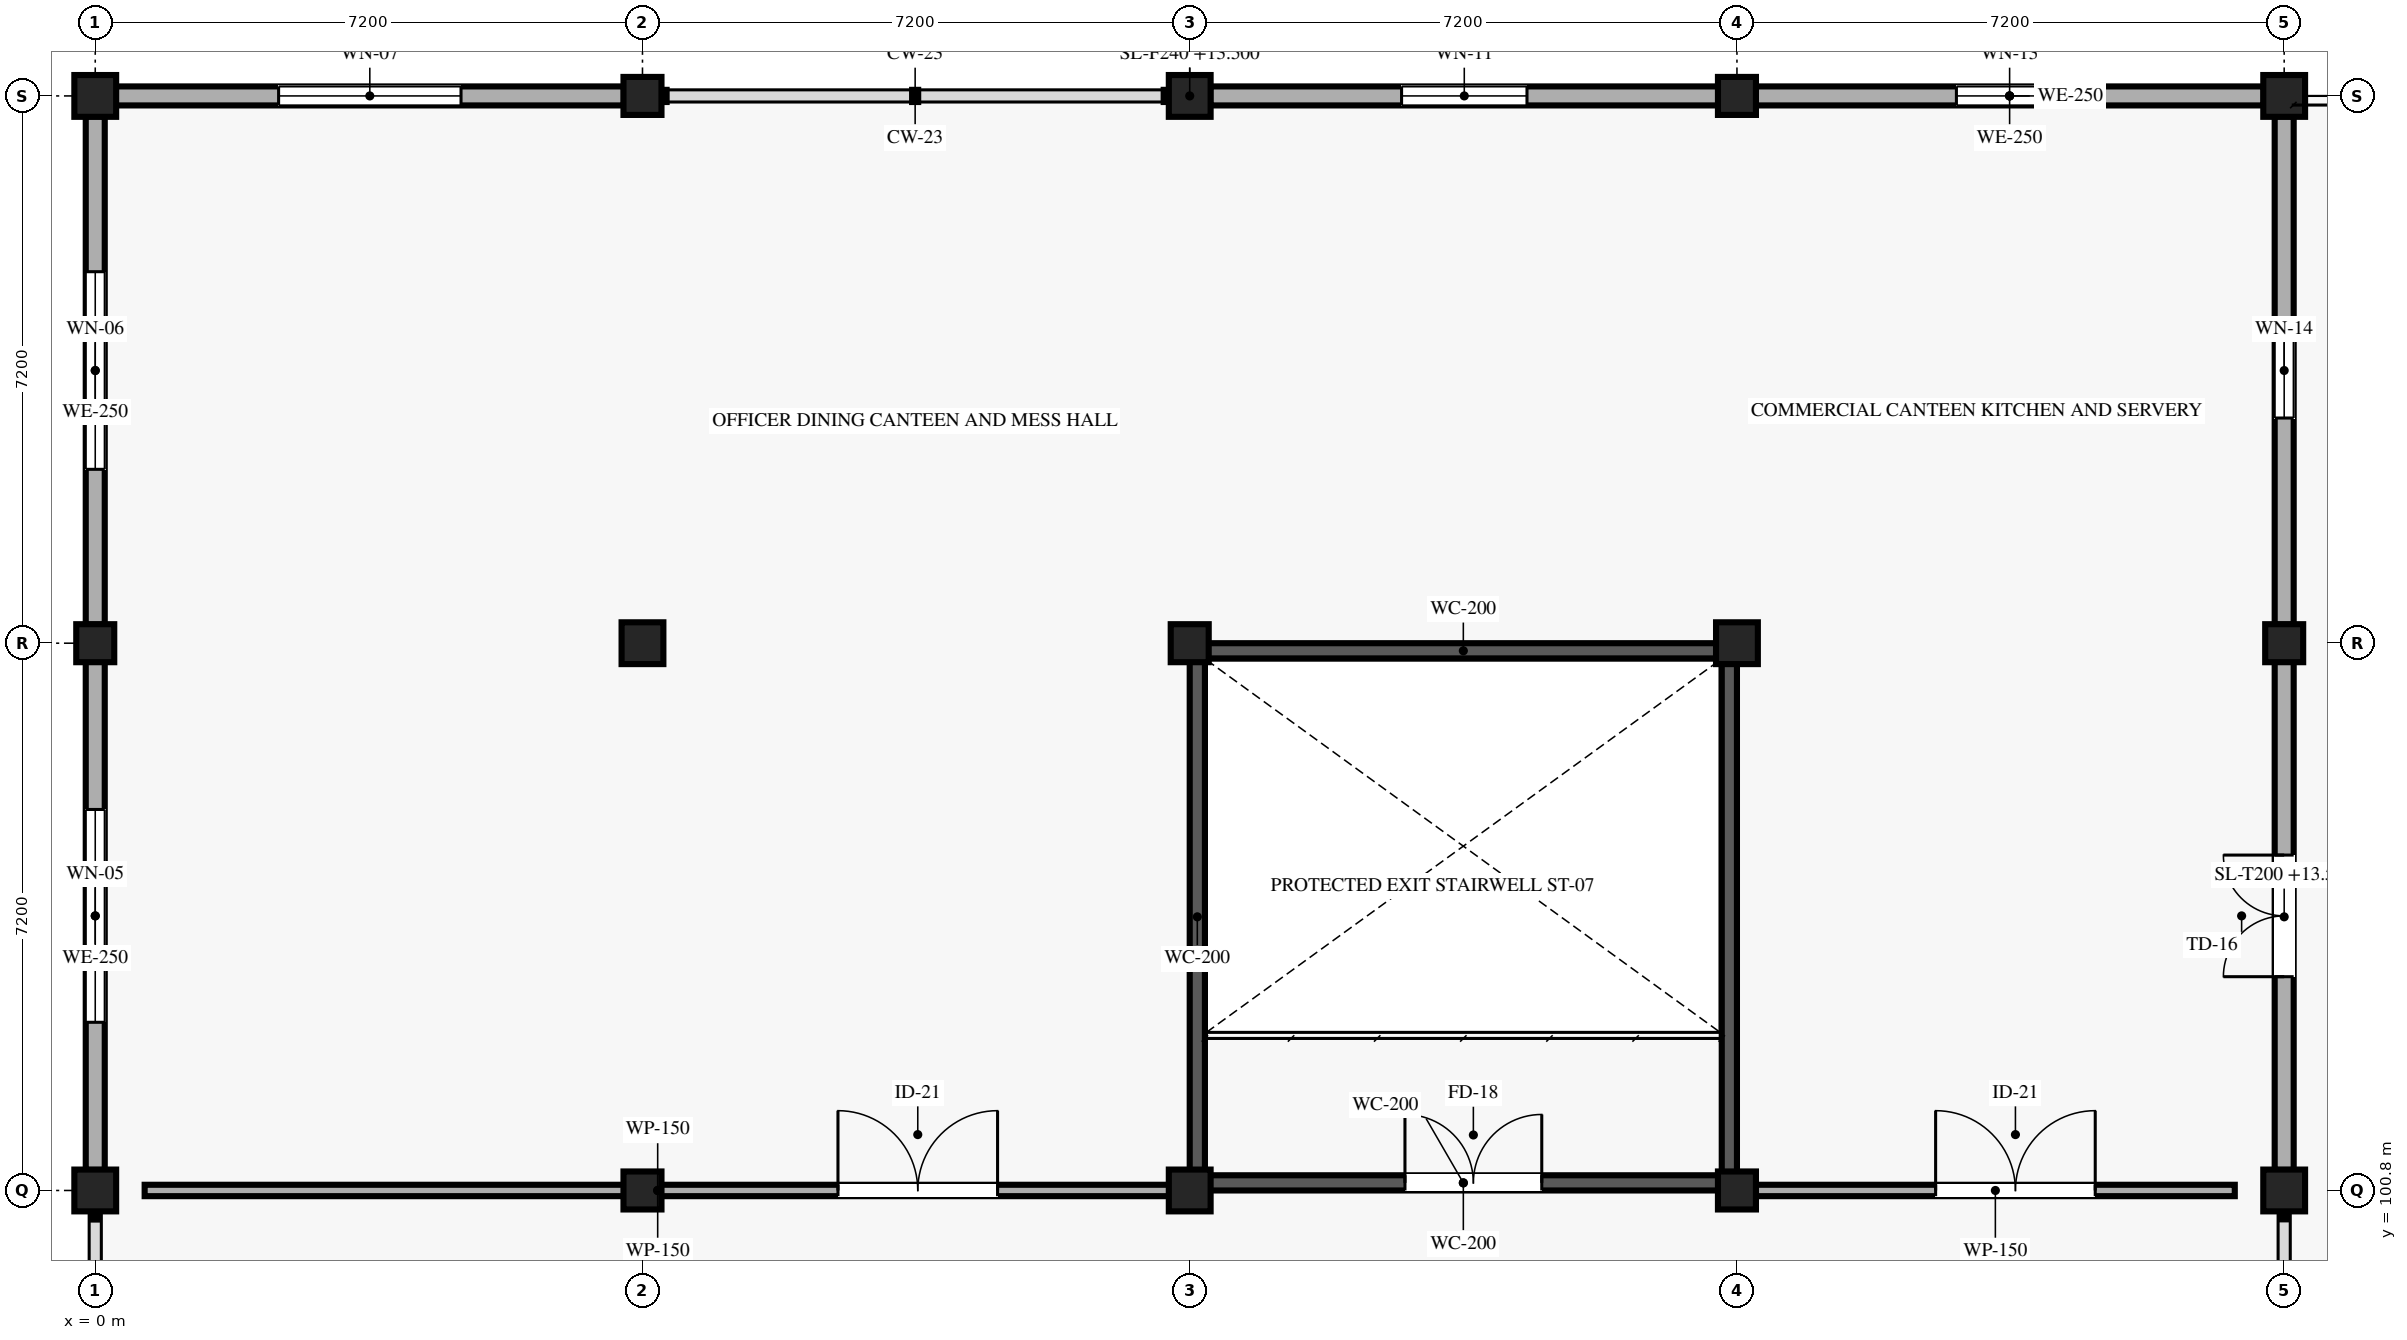
"""IFC4 building model, lengths in metres.
Left out: names, types, materials, properties, quantities, classifications, styles, units other than length and angle.
Written with IfcOpenShell. Run it as: python <this file> out.ifc"""

import sys

from ifc_helpers import new_model, si_unit, direction, frame, frame_2d, origin, origin_2d, place, context, subcontext, project, spatial, rectangle, extrude, element, fill, save


model = new_model("IFC4")
c1 = context("Model", 3, precision=1e-05, world=origin(), true_north=direction((0.0, 1.0)))
c2 = subcontext(c1, "Body", "Model", "MODEL_VIEW")
j1 = project(units=[si_unit("LENGTHUNIT", "METRE"), si_unit("PLANEANGLEUNIT", "RADIAN")], contexts=[c1])
p1 = place(None, origin())
s1 = spatial("IfcSite", under=j1, at=p1, CompositionType="ELEMENT")
p2 = place(p1, origin())
s2 = spatial("IfcBuilding", under=s1, at=p2, CompositionType="ELEMENT")
p3 = place(p2, frame((0.0, 0.0, 13.5)))
s3 = spatial("IfcBuildingStorey", under=s2, at=p3, CompositionType="ELEMENT", Elevation=13.5)
p4 = place(p3, frame((0.0, 100.8, 0.0), z_axis=(0.0, 0.0, 1.0), x_axis=(1.0, 0.0, 0.0)))
e1 = element("IfcColumn", 1, at=p4, inside=s3, PredefinedType="COLUMN", context=c2, shape_type="SweptSolid", body=[
    extrude(rectangle(XDim=0.55, YDim=0.55, at=origin_2d()), origin(), (0.0, 0.0, 1.0), 4.05),
])
p5 = place(p3, frame((0.0, 108.0, 0.0), z_axis=(0.0, 0.0, 1.0), x_axis=(1.0, 0.0, 0.0)))
e2 = element("IfcColumn", 2, at=p5, inside=s3, PredefinedType="COLUMN", context=c2, shape_type="SweptSolid", body=[
    extrude(rectangle(XDim=0.5, YDim=0.5, at=origin_2d()), origin(), (0.0, 0.0, 1.0), 4.05),
])
p6 = place(p3, frame((0.0, 115.2, 0.0), z_axis=(0.0, 0.0, 1.0), x_axis=(1.0, 0.0, 0.0)))
e3 = element("IfcColumn", 3, at=p6, inside=s3, PredefinedType="COLUMN", context=c2, shape_type="SweptSolid", body=[
    extrude(rectangle(XDim=0.55, YDim=0.55, at=origin_2d()), origin(), (0.0, 0.0, 1.0), 4.05),
])
p7 = place(p3, frame((7.2, 100.8, 0.0), z_axis=(0.0, 0.0, 1.0), x_axis=(1.0, 0.0, 0.0)))
e4 = element("IfcColumn", 4, at=p7, inside=s3, PredefinedType="COLUMN", context=c2, shape_type="SweptSolid", body=[
    extrude(rectangle(XDim=0.5, YDim=0.5, at=origin_2d()), origin(), (0.0, 0.0, 1.0), 4.05),
])
p8 = place(p3, frame((7.2, 108.0, 0.0), z_axis=(0.0, 0.0, 1.0), x_axis=(1.0, 0.0, 0.0)))
e5 = element("IfcColumn", 5, at=p8, inside=s3, PredefinedType="COLUMN", context=c2, shape_type="SweptSolid", body=[
    extrude(rectangle(XDim=0.55, YDim=0.55, at=origin_2d()), origin(), (0.0, 0.0, 1.0), 4.05),
])
p9 = place(p3, frame((7.2, 115.2, 0.0), z_axis=(0.0, 0.0, 1.0), x_axis=(1.0, 0.0, 0.0)))
e6 = element("IfcColumn", 6, at=p9, inside=s3, PredefinedType="COLUMN", context=c2, shape_type="SweptSolid", body=[
    extrude(rectangle(XDim=0.5, YDim=0.5, at=origin_2d()), origin(), (0.0, 0.0, 1.0), 4.05),
])
p10 = place(p3, frame((14.4, 100.8, 0.0), z_axis=(0.0, 0.0, 1.0), x_axis=(1.0, 0.0, 0.0)))
e7 = element("IfcColumn", 7, at=p10, inside=s3, PredefinedType="COLUMN", context=c2, shape_type="SweptSolid", body=[
    extrude(rectangle(XDim=0.55, YDim=0.55, at=origin_2d()), origin(), (0.0, 0.0, 1.0), 4.05),
])
p11 = place(p3, frame((14.4, 108.0, 0.0), z_axis=(0.0, 0.0, 1.0), x_axis=(1.0, 0.0, 0.0)))
e8 = element("IfcColumn", 8, at=p11, inside=s3, PredefinedType="COLUMN", context=c2, shape_type="SweptSolid", body=[
    extrude(rectangle(XDim=0.5, YDim=0.5, at=origin_2d()), origin(), (0.0, 0.0, 1.0), 4.05),
])
p12 = place(p3, frame((14.4, 115.2, 0.0), z_axis=(0.0, 0.0, 1.0), x_axis=(1.0, 0.0, 0.0)))
e9 = element("IfcColumn", 9, at=p12, inside=s3, PredefinedType="COLUMN", context=c2, shape_type="SweptSolid", body=[
    extrude(rectangle(XDim=0.55, YDim=0.55, at=origin_2d()), origin(), (0.0, 0.0, 1.0), 4.05),
])
p13 = place(p3, frame((21.6, 100.8, 0.0), z_axis=(0.0, 0.0, 1.0), x_axis=(1.0, 0.0, 0.0)))
e10 = element("IfcColumn", 10, at=p13, inside=s3, PredefinedType="COLUMN", context=c2, shape_type="SweptSolid", body=[
    extrude(rectangle(XDim=0.5, YDim=0.5, at=origin_2d()), origin(), (0.0, 0.0, 1.0), 4.05),
])
p14 = place(p3, frame((21.6, 108.0, 0.0), z_axis=(0.0, 0.0, 1.0), x_axis=(1.0, 0.0, 0.0)))
e11 = element("IfcColumn", 11, at=p14, inside=s3, PredefinedType="COLUMN", context=c2, shape_type="SweptSolid", body=[
    extrude(rectangle(XDim=0.55, YDim=0.55, at=origin_2d()), origin(), (0.0, 0.0, 1.0), 4.05),
])
p15 = place(p3, frame((21.6, 115.2, 0.0), z_axis=(0.0, 0.0, 1.0), x_axis=(1.0, 0.0, 0.0)))
e12 = element("IfcColumn", 12, at=p15, inside=s3, PredefinedType="COLUMN", context=c2, shape_type="SweptSolid", body=[
    extrude(rectangle(XDim=0.5, YDim=0.5, at=origin_2d()), origin(), (0.0, 0.0, 1.0), 4.05),
])
p16 = place(p3, frame((28.8, 100.8, 0.0), z_axis=(0.0, 0.0, 1.0), x_axis=(1.0, 0.0, 0.0)))
e13 = element("IfcColumn", 13, at=p16, inside=s3, PredefinedType="COLUMN", context=c2, shape_type="SweptSolid", body=[
    extrude(rectangle(XDim=0.55, YDim=0.55, at=origin_2d()), origin(), (0.0, 0.0, 1.0), 4.05),
])
p17 = place(p3, frame((28.8, 108.0, 0.0), z_axis=(0.0, 0.0, 1.0), x_axis=(1.0, 0.0, 0.0)))
e14 = element("IfcColumn", 14, at=p17, inside=s3, PredefinedType="COLUMN", context=c2, shape_type="SweptSolid", body=[
    extrude(rectangle(XDim=0.5, YDim=0.5, at=origin_2d()), origin(), (0.0, 0.0, 1.0), 4.05),
])
p18 = place(p3, frame((28.8, 115.2, 0.0), z_axis=(0.0, 0.0, 1.0), x_axis=(1.0, 0.0, 0.0)))
e15 = element("IfcColumn", 15, at=p18, inside=s3, PredefinedType="COLUMN", context=c2, shape_type="SweptSolid", body=[
    extrude(rectangle(XDim=0.55, YDim=0.55, at=origin_2d()), origin(), (0.0, 0.0, 1.0), 4.05),
])
p19 = place(p3, frame((0.27, 115.2, 0.0), z_axis=(0.0, 0.0, 1.0), x_axis=(1.0, 0.0, 0.0)))
e16 = element("IfcWall", 16, at=p19, inside=s3, PredefinedType="SOLIDWALL", context=c2, shape_type="SweptSolid", body=[
    extrude(rectangle(XDim=6.685, YDim=0.25, at=frame_2d((3.343, 0.0))), origin(), (0.0, 0.0, 1.0), 3.195),
])
p20 = place(p19, frame((2.143, 0.0, 0.85)))
e17 = element("IfcOpeningElement", 17, at=p20, cuts=e16, PredefinedType="OPENING", context=c2, shape_type="SweptSolid", body=[
    extrude(rectangle(XDim=2.4, YDim=1.75, at=frame_2d((1.2, 0.875))), frame((0.0, 0.135, 0.0), z_axis=(0.0, -1.0, 0.0), x_axis=(1.0, 0.0, 0.0)), (0.0, 0.0, 1.0), 0.27),
])
p21 = place(p3, frame((14.67, 115.2, 0.0), z_axis=(0.0, 0.0, 1.0), x_axis=(1.0, 0.0, 0.0)))
e18 = element("IfcWall", 18, at=p21, inside=s3, PredefinedType="SOLIDWALL", context=c2, shape_type="SweptSolid", body=[
    extrude(rectangle(XDim=6.685, YDim=0.25, at=frame_2d((3.343, 0.0))), origin(), (0.0, 0.0, 1.0), 3.195),
])
p22 = place(p21, frame((2.518, 0.0, 0.85)))
e19 = element("IfcOpeningElement", 19, at=p22, cuts=e18, PredefinedType="OPENING", context=c2, shape_type="SweptSolid", body=[
    extrude(rectangle(XDim=1.65, YDim=1.55, at=frame_2d((0.825, 0.775))), frame((0.0, 0.135, 0.0), z_axis=(0.0, -1.0, 0.0), x_axis=(1.0, 0.0, 0.0)), (0.0, 0.0, 1.0), 0.27),
])
p23 = place(p3, frame((21.845, 115.2, 0.0), z_axis=(0.0, 0.0, 1.0), x_axis=(1.0, 0.0, 0.0)))
e20 = element("IfcWall", 20, at=p23, inside=s3, PredefinedType="SOLIDWALL", context=c2, shape_type="SweptSolid", body=[
    extrude(rectangle(XDim=6.685, YDim=0.25, at=frame_2d((3.343, 0.0))), origin(), (0.0, 0.0, 1.0), 3.195),
])
p24 = place(p23, frame((2.643, 0.0, 0.85)))
e21 = element("IfcOpeningElement", 21, at=p24, cuts=e20, PredefinedType="OPENING", context=c2, shape_type="SweptSolid", body=[
    extrude(rectangle(XDim=1.4, YDim=1.6, at=frame_2d((0.7, 0.8))), frame((0.0, 0.135, 0.0), z_axis=(0.0, -1.0, 0.0), x_axis=(1.0, 0.0, 0.0)), (0.0, 0.0, 1.0), 0.27),
])
p25 = place(p3, frame((0.0, 101.07, 0.0), z_axis=(0.0, 0.0, 1.0), x_axis=(0.0, 1.0, 0.0)))
e22 = element("IfcWall", 22, at=p25, inside=s3, PredefinedType="SOLIDWALL", context=c2, shape_type="SweptSolid", body=[
    extrude(rectangle(XDim=6.685, YDim=0.25, at=frame_2d((3.342, 0.0))), origin(), (0.0, 0.0, 1.0), 3.195),
])
p26 = place(p25, frame((1.942, 0.0, 0.85)))
e23 = element("IfcOpeningElement", 23, at=p26, cuts=e22, PredefinedType="OPENING", context=c2, shape_type="SweptSolid", body=[
    extrude(rectangle(XDim=2.8, YDim=1.85, at=frame_2d((1.4, 0.925))), frame((0.0, 0.135, 0.0), z_axis=(0.0, -1.0, 0.0), x_axis=(1.0, 0.0, 0.0)), (0.0, 0.0, 1.0), 0.27),
])
p27 = place(p3, frame((0.0, 108.245, 0.0), z_axis=(0.0, 0.0, 1.0), x_axis=(0.0, 1.0, 0.0)))
e24 = element("IfcWall", 24, at=p27, inside=s3, PredefinedType="SOLIDWALL", context=c2, shape_type="SweptSolid", body=[
    extrude(rectangle(XDim=6.685, YDim=0.25, at=frame_2d((3.342, 0.0))), origin(), (0.0, 0.0, 1.0), 3.195),
])
p28 = place(p27, frame((2.042, 0.0, 0.85)))
e25 = element("IfcOpeningElement", 25, at=p28, cuts=e24, PredefinedType="OPENING", context=c2, shape_type="SweptSolid", body=[
    extrude(rectangle(XDim=2.6, YDim=1.8, at=frame_2d((1.3, 0.9))), frame((0.0, 0.135, 0.0), z_axis=(0.0, -1.0, 0.0), x_axis=(1.0, 0.0, 0.0)), (0.0, 0.0, 1.0), 0.27),
])
p29 = place(p3, frame((28.8, 101.07, 0.0), z_axis=(0.0, 0.0, 1.0), x_axis=(0.0, 1.0, 0.0)))
e26 = element("IfcWall", 26, at=p29, inside=s3, PredefinedType="SOLIDWALL", context=c2, shape_type="SweptSolid", body=[
    extrude(rectangle(XDim=6.685, YDim=0.25, at=frame_2d((3.342, 0.0))), origin(), (0.0, 0.0, 1.0), 3.195),
])
p30 = place(p29, frame((2.542, 0.0, 0.0)))
e27 = element("IfcOpeningElement", 27, at=p30, cuts=e26, PredefinedType="OPENING", context=c2, shape_type="SweptSolid", body=[
    extrude(rectangle(XDim=1.6, YDim=2.2, at=frame_2d((0.8, 1.1))), frame((0.0, 0.135, 0.0), z_axis=(0.0, -1.0, 0.0), x_axis=(1.0, 0.0, 0.0)), (0.0, 0.0, 1.0), 0.27),
])
p31 = place(p3, frame((28.8, 108.245, 0.0), z_axis=(0.0, 0.0, 1.0), x_axis=(0.0, 1.0, 0.0)))
e28 = element("IfcWall", 28, at=p31, inside=s3, PredefinedType="SOLIDWALL", context=c2, shape_type="SweptSolid", body=[
    extrude(rectangle(XDim=6.685, YDim=0.25, at=frame_2d((3.342, 0.0))), origin(), (0.0, 0.0, 1.0), 3.195),
])
p32 = place(p31, frame((2.718, 0.0, 0.85)))
e29 = element("IfcOpeningElement", 29, at=p32, cuts=e28, PredefinedType="OPENING", context=c2, shape_type="SweptSolid", body=[
    extrude(rectangle(XDim=1.25, YDim=1.5, at=frame_2d((0.625, 0.75))), frame((0.0, 0.135, 0.0), z_axis=(0.0, -1.0, 0.0), x_axis=(1.0, 0.0, 0.0)), (0.0, 0.0, 1.0), 0.27),
])
p33 = place(p3, frame((14.6, 100.9, 0.0), z_axis=(0.0, 0.0, 1.0), x_axis=(1.0, 0.0, 0.0)))
e30 = element("IfcWall", 30, at=p33, inside=s3, PredefinedType="SHEAR", context=c2, shape_type="SweptSolid", body=[
    extrude(rectangle(XDim=6.8, YDim=0.2, at=frame_2d((3.4, 0.0))), origin(), (0.0, 0.0, 1.0), 3.81),
])
p34 = place(p33, frame((2.632, 0.0, 0.0)))
e31 = element("IfcOpeningElement", 31, at=p34, cuts=e30, PredefinedType="OPENING", context=c2, shape_type="SweptSolid", body=[
    extrude(rectangle(XDim=1.8, YDim=2.2, at=frame_2d((0.9, 1.1))), frame((0.0, 0.11, 0.0), z_axis=(0.0, -1.0, 0.0), x_axis=(1.0, 0.0, 0.0)), (0.0, 0.0, 1.0), 0.22),
])
p35 = place(p3, frame((14.6, 107.9, 0.0), z_axis=(0.0, 0.0, 1.0), x_axis=(1.0, 0.0, 0.0)))
e32 = element("IfcWall", 32, at=p35, inside=s3, PredefinedType="SHEAR", context=c2, shape_type="SweptSolid", body=[
    extrude(rectangle(XDim=6.8, YDim=0.2, at=frame_2d((3.4, 0.0))), origin(), (0.0, 0.0, 1.0), 3.81),
])
for number, where, z_axis, x_axis in (
    (33, (14.5, 101.0, 0.0), (0.0, 0.0, 1.0), (0.0, 1.0, 0.0)),
    (34, (21.5, 101.0, 0.0), (0.0, 0.0, 1.0), (0.0, 1.0, 0.0)),
):
    element("IfcWall", number, at=place(p3, frame(where, z_axis=z_axis, x_axis=x_axis)), inside=s3, PredefinedType="SHEAR", context=c2, shape_type="SweptSolid", body=[
        extrude(rectangle(XDim=6.8, YDim=0.2, at=frame_2d((3.4, 0.0))), origin(), (0.0, 0.0, 1.0), 3.81),
    ])
p36 = place(p3, frame((0.65, 100.8, 0.0), z_axis=(0.0, 0.0, 1.0), x_axis=(1.0, 0.0, 0.0)))
e35 = element("IfcWall", 35, at=p36, inside=s3, PredefinedType="PARTITIONING", context=c2, shape_type="SweptSolid", body=[
    extrude(rectangle(XDim=13.5, YDim=0.15, at=frame_2d((6.75, 0.0))), origin(), (0.0, 0.0, 1.0), 3.2),
])
p37 = place(p36, frame((9.122, 0.0, 0.0)))
e36 = element("IfcOpeningElement", 36, at=p37, cuts=e35, PredefinedType="OPENING", context=c2, shape_type="SweptSolid", body=[
    extrude(rectangle(XDim=2.1, YDim=2.4, at=frame_2d((1.05, 1.2))), frame((0.0, 0.085, 0.0), z_axis=(0.0, -1.0, 0.0), x_axis=(1.0, 0.0, 0.0)), (0.0, 0.0, 1.0), 0.17),
])
p38 = place(p3, frame((21.85, 100.8, 0.0), z_axis=(0.0, 0.0, 1.0), x_axis=(1.0, 0.0, 0.0)))
e37 = element("IfcWall", 37, at=p38, inside=s3, PredefinedType="PARTITIONING", context=c2, shape_type="SweptSolid", body=[
    extrude(rectangle(XDim=6.3, YDim=0.15, at=frame_2d((3.15, 0.0))), origin(), (0.0, 0.0, 1.0), 3.2),
])
p39 = place(p38, frame((2.364, 0.0, 0.0)))
e38 = element("IfcOpeningElement", 38, at=p39, cuts=e37, PredefinedType="OPENING", context=c2, shape_type="SweptSolid", body=[
    extrude(rectangle(XDim=2.1, YDim=2.4, at=frame_2d((1.05, 1.2))), frame((0.0, 0.085, 0.0), z_axis=(0.0, -1.0, 0.0), x_axis=(1.0, 0.0, 0.0)), (0.0, 0.0, 1.0), 0.17),
])
p40 = place(p20, origin())
e39 = element("IfcWindow", 39, at=p40, inside=s3, PartitioningType="SINGLE_PANEL", PredefinedType="WINDOW", context=c2, shape_type="SweptSolid", body=[
    extrude(rectangle(XDim=2.4, YDim=1.75, at=frame_2d((1.2, 0.875))), frame((0.0, 0.03, 0.0), z_axis=(0.0, -1.0, 0.0), x_axis=(1.0, 0.0, 0.0)), (0.0, 0.0, 1.0), 0.06),
])
fill(e17, e39)
p41 = place(p22, origin())
e40 = element("IfcWindow", 40, at=p41, inside=s3, PartitioningType="SINGLE_PANEL", PredefinedType="WINDOW", context=c2, shape_type="SweptSolid", body=[
    extrude(rectangle(XDim=1.65, YDim=1.55, at=frame_2d((0.825, 0.775))), frame((0.0, 0.03, 0.0), z_axis=(0.0, -1.0, 0.0), x_axis=(1.0, 0.0, 0.0)), (0.0, 0.0, 1.0), 0.06),
])
fill(e19, e40)
p42 = place(p24, origin())
e41 = element("IfcWindow", 41, at=p42, inside=s3, PartitioningType="SINGLE_PANEL", PredefinedType="WINDOW", context=c2, shape_type="SweptSolid", body=[
    extrude(rectangle(XDim=1.4, YDim=1.6, at=frame_2d((0.7, 0.8))), frame((0.0, 0.03, 0.0), z_axis=(0.0, -1.0, 0.0), x_axis=(1.0, 0.0, 0.0)), (0.0, 0.0, 1.0), 0.06),
])
fill(e21, e41)
p43 = place(p26, origin())
e42 = element("IfcWindow", 42, at=p43, inside=s3, PartitioningType="SINGLE_PANEL", PredefinedType="WINDOW", context=c2, shape_type="SweptSolid", body=[
    extrude(rectangle(XDim=2.8, YDim=1.85, at=frame_2d((1.4, 0.925))), frame((0.0, 0.03, 0.0), z_axis=(0.0, -1.0, 0.0), x_axis=(1.0, 0.0, 0.0)), (0.0, 0.0, 1.0), 0.06),
])
fill(e23, e42)
p44 = place(p28, origin())
e43 = element("IfcWindow", 43, at=p44, inside=s3, PartitioningType="SINGLE_PANEL", PredefinedType="WINDOW", context=c2, shape_type="SweptSolid", body=[
    extrude(rectangle(XDim=2.6, YDim=1.8, at=frame_2d((1.3, 0.9))), frame((0.0, 0.03, 0.0), z_axis=(0.0, -1.0, 0.0), x_axis=(1.0, 0.0, 0.0)), (0.0, 0.0, 1.0), 0.06),
])
fill(e25, e43)
p45 = place(p30, origin())
e44 = element("IfcDoor", 44, at=p45, inside=s3, OperationType="DOUBLE_DOOR_SINGLE_SWING", PredefinedType="DOOR", context=c2, shape_type="SweptSolid", body=[
    extrude(rectangle(XDim=1.6, YDim=2.2, at=frame_2d((0.8, 1.1))), frame((0.0, 0.025, 0.0), z_axis=(0.0, -1.0, 0.0), x_axis=(1.0, 0.0, 0.0)), (0.0, 0.0, 1.0), 0.05),
])
fill(e27, e44)
p46 = place(p32, origin())
e45 = element("IfcWindow", 45, at=p46, inside=s3, PartitioningType="SINGLE_PANEL", PredefinedType="WINDOW", context=c2, shape_type="SweptSolid", body=[
    extrude(rectangle(XDim=1.25, YDim=1.5, at=frame_2d((0.625, 0.75))), frame((0.0, 0.03, 0.0), z_axis=(0.0, -1.0, 0.0), x_axis=(1.0, 0.0, 0.0)), (0.0, 0.0, 1.0), 0.06),
])
fill(e29, e45)
p47 = place(p34, origin())
e46 = element("IfcDoor", 46, at=p47, inside=s3, OperationType="DOUBLE_DOOR_SINGLE_SWING", PredefinedType="DOOR", context=c2, shape_type="SweptSolid", body=[
    extrude(rectangle(XDim=1.8, YDim=2.2, at=frame_2d((0.9, 1.1))), frame((0.0, 0.025, 0.0), z_axis=(0.0, -1.0, 0.0), x_axis=(1.0, 0.0, 0.0)), (0.0, 0.0, 1.0), 0.05),
])
fill(e31, e46)
p48 = place(p37, origin())
e47 = element("IfcDoor", 47, at=p48, inside=s3, OperationType="DOUBLE_DOOR_SINGLE_SWING", PredefinedType="DOOR", context=c2, shape_type="SweptSolid", body=[
    extrude(rectangle(XDim=2.1, YDim=2.4, at=frame_2d((1.05, 1.2))), frame((0.0, 0.025, 0.0), z_axis=(0.0, -1.0, 0.0), x_axis=(1.0, 0.0, 0.0)), (0.0, 0.0, 1.0), 0.05),
])
fill(e36, e47)
p49 = place(p39, origin())
e48 = element("IfcDoor", 48, at=p49, inside=s3, OperationType="DOUBLE_DOOR_SINGLE_SWING", PredefinedType="DOOR", context=c2, shape_type="SweptSolid", body=[
    extrude(rectangle(XDim=2.1, YDim=2.4, at=frame_2d((1.05, 1.2))), frame((0.0, 0.025, 0.0), z_axis=(0.0, -1.0, 0.0), x_axis=(1.0, 0.0, 0.0)), (0.0, 0.0, 1.0), 0.05),
])
fill(e38, e48)
save(model, sys.argv[1])
